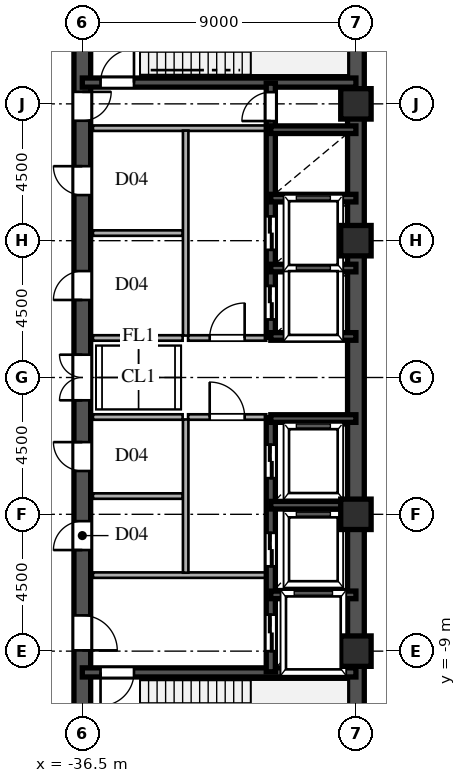
"""IFC4 building model, lengths in metres.
Left out: names, types, materials, properties, quantities, classifications, styles, units other than length and angle.
Written with IfcOpenShell. Run it as: python <this file> out.ifc"""

import sys

from ifc_helpers import new_model, si_unit, direction, frame, frame_2d, origin, origin_2d, place, context, subcontext, project, spatial, rectangle, hollow_rectangle, extrude, source, transform, mapped, element, fill, save


model = new_model("IFC4")
c1 = context("Model", 3, precision=1e-05, world=origin(), true_north=direction((0.0, 1.0)))
c2 = subcontext(c1, "Body", "Model", "MODEL_VIEW")
j1 = project(units=[si_unit("LENGTHUNIT", "METRE"), si_unit("PLANEANGLEUNIT", "RADIAN")], contexts=[c1])
p1 = place(None, origin())
s1 = spatial("IfcSite", under=j1, at=p1, CompositionType="ELEMENT")
p2 = place(p1, origin())
s2 = spatial("IfcBuilding", under=s1, at=p2, CompositionType="ELEMENT")
p3 = place(p2, frame((0.0, 0.0, 135.6)))
s3 = spatial("IfcBuildingStorey", under=s2, at=p3, CompositionType="ELEMENT", Elevation=135.6)
m1 = source(origin(), c2, "Body", "SweptSolid", [
    extrude(hollow_rectangle(XDim=1.0, YDim=1.0, WallThickness=0.042, at=origin_2d()), origin(), (0.0, 0.0, 1.0), 4.8),
])
for number, where, z_axis, x_axis in (
    (1, (-27.5, -9.0, 0.0), (0.0, 0.0, 1.0), (1.0, 0.0, 0.0)),
    (2, (-27.5, -4.5, 0.0), (0.0, 0.0, 1.0), (1.0, 0.0, 0.0)),
    (3, (-27.5, 4.5, 0.0), (0.0, 0.0, 1.0), (1.0, 0.0, 0.0)),
    (4, (-27.5, 9.0, 0.0), (0.0, 0.0, 1.0), (1.0, 0.0, 0.0)),
):
    element("IfcColumn", number, at=place(p3, frame(where, z_axis=z_axis, x_axis=x_axis)), inside=s3, PredefinedType="COLUMN", context=c2, shape_type="MappedRepresentation", body=[
        mapped(m1, transform((0.0, 0.0, 0.0), scale=1.0)),
    ])
for number, where, z_axis, x_axis in (
    (5, (-27.5, -13.5, 0.0), (0.0, 0.0, 1.0), (0.0, 1.0, 0.0)),
    (6, (-27.5, 1.3, 0.0), (0.0, 0.0, 1.0), (0.0, 1.0, 0.0)),
):
    element("IfcWall", number, at=place(p3, frame(where, z_axis=z_axis, x_axis=x_axis)), inside=s3, PredefinedType="SHEAR", context=c2, shape_type="SweptSolid", body=[
        extrude(rectangle(XDim=12.2, YDim=0.55, at=frame_2d((6.1, 0.0))), origin(), (0.0, 0.0, 1.0), 4.58),
    ])
p4 = place(p3, frame((-27.5, -1.3, 0.0), z_axis=(0.0, 0.0, 1.0), x_axis=(0.0, 1.0, 0.0)))
e7 = element("IfcWall", 7, at=p4, inside=s3, PredefinedType="SHEAR", context=c2, shape_type="SweptSolid", body=[
    extrude(rectangle(XDim=2.6, YDim=0.55, at=frame_2d((1.3, 0.0))), origin(), (0.0, 0.0, 1.0), 4.58),
])
p5 = place(p3, frame((-36.5, -13.65, 0.0), z_axis=(0.0, 0.0, 1.0), x_axis=(0.0, 1.0, 0.0)))
e8 = element("IfcWall", 8, at=p5, inside=s3, PredefinedType="SHEAR", context=c2, shape_type="SweptSolid", body=[
    extrude(rectangle(XDim=7.15, YDim=0.55, at=frame_2d((3.575, 0.0))), origin(), (0.0, 0.0, 1.0), 4.58),
])
p6 = place(p5, frame((4.675, 0.0, 0.0)))
e9 = element("IfcOpeningElement", 9, at=p6, cuts=e8, PredefinedType="OPENING", context=c2, shape_type="SweptSolid", body=[
    extrude(rectangle(XDim=1.15, YDim=2.2, at=frame_2d((0.575, 1.1))), frame((0.0, 0.285, 0.0), z_axis=(0.0, -1.0, 0.0), x_axis=(1.0, 0.0, 0.0)), (0.0, 0.0, 1.0), 0.57),
])
p7 = place(p3, frame((-36.5, -1.3, 0.0), z_axis=(0.0, 0.0, 1.0), x_axis=(0.0, 1.0, 0.0)))
e10 = element("IfcWall", 10, at=p7, inside=s3, PredefinedType="SHEAR", context=c2, shape_type="SweptSolid", body=[
    extrude(rectangle(XDim=2.6, YDim=0.55, at=frame_2d((1.3, 0.0))), origin(), (0.0, 0.0, 1.0), 4.58),
])
p8 = place(p7, frame((0.55, 0.0, 0.0)))
e11 = element("IfcOpeningElement", 11, at=p8, cuts=e10, PredefinedType="OPENING", context=c2, shape_type="SweptSolid", body=[
    extrude(rectangle(XDim=1.5, YDim=2.3, at=frame_2d((0.75, 1.15))), frame((0.0, 0.285, 0.0), z_axis=(0.0, -1.0, 0.0), x_axis=(1.0, 0.0, 0.0)), (0.0, 0.0, 1.0), 0.57),
])
p9 = place(p3, frame((-36.5, 8.2, 0.0), z_axis=(0.0, 0.0, 1.0), x_axis=(0.0, 1.0, 0.0)))
e12 = element("IfcWall", 12, at=p9, inside=s3, PredefinedType="SHEAR", context=c2, shape_type="SweptSolid", body=[
    extrude(rectangle(XDim=5.45, YDim=0.55, at=frame_2d((2.725, 0.0))), origin(), (0.0, 0.0, 1.0), 4.58),
])
p10 = place(p9, frame((0.245, 0.0, 0.0)))
e13 = element("IfcOpeningElement", 13, at=p10, cuts=e12, PredefinedType="OPENING", context=c2, shape_type="SweptSolid", body=[
    extrude(rectangle(XDim=0.95, YDim=2.15, at=frame_2d((0.475, 1.075))), frame((0.0, 0.285, 0.0), z_axis=(0.0, -1.0, 0.0), x_axis=(1.0, 0.0, 0.0)), (0.0, 0.0, 1.0), 0.57),
])
p11 = place(p3, frame((-36.5, -6.5, 0.0), z_axis=(0.0, 0.0, 1.0), x_axis=(0.0, 1.0, 0.0)))
e14 = element("IfcWall", 14, at=p11, inside=s3, PredefinedType="SHEAR", context=c2, shape_type="SweptSolid", body=[
    extrude(rectangle(XDim=2.6, YDim=0.55, at=frame_2d((1.3, 0.0))), origin(), (0.0, 0.0, 1.0), 4.58),
])
p12 = place(p11, frame((0.825, 0.0, 0.0)))
e15 = element("IfcOpeningElement", 15, at=p12, cuts=e14, PredefinedType="OPENING", context=c2, shape_type="SweptSolid", body=[
    extrude(rectangle(XDim=0.95, YDim=2.15, at=frame_2d((0.475, 1.075))), frame((0.0, 0.285, 0.0), z_axis=(0.0, -1.0, 0.0), x_axis=(1.0, 0.0, 0.0)), (0.0, 0.0, 1.0), 0.57),
])
p13 = place(p3, frame((-36.5, -3.9, 0.0), z_axis=(0.0, 0.0, 1.0), x_axis=(0.0, 1.0, 0.0)))
e16 = element("IfcWall", 16, at=p13, inside=s3, PredefinedType="SHEAR", context=c2, shape_type="SweptSolid", body=[
    extrude(rectangle(XDim=2.6, YDim=0.55, at=frame_2d((1.3, 0.0))), origin(), (0.0, 0.0, 1.0), 4.58),
])
p14 = place(p13, frame((0.825, 0.0, 0.0)))
e17 = element("IfcOpeningElement", 17, at=p14, cuts=e16, PredefinedType="OPENING", context=c2, shape_type="SweptSolid", body=[
    extrude(rectangle(XDim=0.95, YDim=2.15, at=frame_2d((0.475, 1.075))), frame((0.0, 0.285, 0.0), z_axis=(0.0, -1.0, 0.0), x_axis=(1.0, 0.0, 0.0)), (0.0, 0.0, 1.0), 0.57),
])
p15 = place(p3, frame((-36.5, 1.3, 0.0), z_axis=(0.0, 0.0, 1.0), x_axis=(0.0, 1.0, 0.0)))
e18 = element("IfcWall", 18, at=p15, inside=s3, PredefinedType="SHEAR", context=c2, shape_type="SweptSolid", body=[
    extrude(rectangle(XDim=3.45, YDim=0.55, at=frame_2d((1.725, 0.0))), origin(), (0.0, 0.0, 1.0), 4.58),
])
p16 = place(p15, frame((1.25, 0.0, 0.0)))
e19 = element("IfcOpeningElement", 19, at=p16, cuts=e18, PredefinedType="OPENING", context=c2, shape_type="SweptSolid", body=[
    extrude(rectangle(XDim=0.95, YDim=2.15, at=frame_2d((0.475, 1.075))), frame((0.0, 0.285, 0.0), z_axis=(0.0, -1.0, 0.0), x_axis=(1.0, 0.0, 0.0)), (0.0, 0.0, 1.0), 0.57),
])
p17 = place(p3, frame((-36.5, 4.75, 0.0), z_axis=(0.0, 0.0, 1.0), x_axis=(0.0, 1.0, 0.0)))
e20 = element("IfcWall", 20, at=p17, inside=s3, PredefinedType="SHEAR", context=c2, shape_type="SweptSolid", body=[
    extrude(rectangle(XDim=3.45, YDim=0.55, at=frame_2d((1.725, 0.0))), origin(), (0.0, 0.0, 1.0), 4.58),
])
p18 = place(p17, frame((1.25, 0.0, 0.0)))
e21 = element("IfcOpeningElement", 21, at=p18, cuts=e20, PredefinedType="OPENING", context=c2, shape_type="SweptSolid", body=[
    extrude(rectangle(XDim=0.95, YDim=2.15, at=frame_2d((0.475, 1.075))), frame((0.0, 0.285, 0.0), z_axis=(0.0, -1.0, 0.0), x_axis=(1.0, 0.0, 0.0)), (0.0, 0.0, 1.0), 0.57),
])
p19 = place(p3, frame((-36.5, -9.7, 0.0), z_axis=(0.0, 0.0, 1.0), x_axis=(1.0, 0.0, 0.0)))
e22 = element("IfcWall", 22, at=p19, inside=s3, PredefinedType="SHEAR", context=c2, shape_type="SweptSolid", body=[
    extrude(rectangle(XDim=9.0, YDim=0.3, at=frame_2d((4.5, 0.0))), origin(), (0.0, 0.0, 1.0), 4.58),
])
p20 = place(p19, frame((0.6, 0.0, 0.0)))
e23 = element("IfcOpeningElement", 23, at=p20, cuts=e22, PredefinedType="OPENING", context=c2, shape_type="SweptSolid", body=[
    extrude(rectangle(XDim=1.1, YDim=2.2, at=frame_2d((0.55, 1.1))), frame((0.0, 0.16, 0.0), z_axis=(0.0, -1.0, 0.0), x_axis=(1.0, 0.0, 0.0)), (0.0, 0.0, 1.0), 0.32),
])
p21 = place(p3, frame((-36.5, 9.7, 0.0), z_axis=(0.0, 0.0, 1.0), x_axis=(1.0, 0.0, 0.0)))
e24 = element("IfcWall", 24, at=p21, inside=s3, PredefinedType="SHEAR", context=c2, shape_type="SweptSolid", body=[
    extrude(rectangle(XDim=9.0, YDim=0.3, at=frame_2d((4.5, 0.0))), origin(), (0.0, 0.0, 1.0), 4.58),
])
p22 = place(p21, frame((0.6, 0.0, 0.0)))
e25 = element("IfcOpeningElement", 25, at=p22, cuts=e24, PredefinedType="OPENING", context=c2, shape_type="SweptSolid", body=[
    extrude(rectangle(XDim=1.1, YDim=2.2, at=frame_2d((0.55, 1.1))), frame((0.0, 0.16, 0.0), z_axis=(0.0, -1.0, 0.0), x_axis=(1.0, 0.0, 0.0)), (0.0, 0.0, 1.0), 0.32),
])
for number, where, z_axis, x_axis in (
    (26, (-30.3, -7.15, 0.0), (0.0, 0.0, 1.0), (1.0, 0.0, 0.0)),
    (27, (-30.3, -4.2, 0.0), (0.0, 0.0, 1.0), (1.0, 0.0, 0.0)),
    (28, (-30.3, -1.35, 0.0), (0.0, 0.0, 1.0), (1.0, 0.0, 0.0)),
    (29, (-30.3, 1.35, 0.0), (0.0, 0.0, 1.0), (1.0, 0.0, 0.0)),
    (30, (-30.3, 3.6, 0.0), (0.0, 0.0, 1.0), (1.0, 0.0, 0.0)),
    (31, (-30.3, 5.9, 0.0), (0.0, 0.0, 1.0), (1.0, 0.0, 0.0)),
    (32, (-30.3, 8.15, 0.0), (0.0, 0.0, 1.0), (1.0, 0.0, 0.0)),
):
    element("IfcWall", number, at=place(p3, frame(where, z_axis=z_axis, x_axis=x_axis)), inside=s3, PredefinedType="SHEAR", context=c2, shape_type="SweptSolid", body=[
        extrude(rectangle(XDim=2.8, YDim=0.25, at=frame_2d((1.4, 0.0))), origin(), (0.0, 0.0, 1.0), 4.58),
    ])
p23 = place(p3, frame((-30.3, -9.68, 0.0), z_axis=(0.0, 0.0, 1.0), x_axis=(0.0, 1.0, 0.0)))
e33 = element("IfcWall", 33, at=p23, inside=s3, PredefinedType="SHEAR", context=c2, shape_type="SweptSolid", body=[
    extrude(rectangle(XDim=2.56, YDim=0.3, at=frame_2d((1.28, 0.0))), origin(), (0.0, 0.0, 1.0), 4.58),
])
p24 = place(p23, frame((0.68, 0.0, 0.0)))
e34 = element("IfcOpeningElement", 34, at=p24, cuts=e33, PredefinedType="OPENING", context=c2, shape_type="SweptSolid", body=[
    extrude(rectangle(XDim=1.2, YDim=2.25, at=frame_2d((0.6, 1.125))), frame((0.0, 0.16, 0.0), z_axis=(0.0, -1.0, 0.0), x_axis=(1.0, 0.0, 0.0)), (0.0, 0.0, 1.0), 0.32),
])
p25 = place(p3, frame((-30.3, -7.12, 0.0), z_axis=(0.0, 0.0, 1.0), x_axis=(0.0, 1.0, 0.0)))
e35 = element("IfcWall", 35, at=p25, inside=s3, PredefinedType="SHEAR", context=c2, shape_type="SweptSolid", body=[
    extrude(rectangle(XDim=2.92, YDim=0.3, at=frame_2d((1.46, 0.0))), origin(), (0.0, 0.0, 1.0), 4.58),
])
p26 = place(p25, frame((0.91, 0.0, 0.0)))
e36 = element("IfcOpeningElement", 36, at=p26, cuts=e35, PredefinedType="OPENING", context=c2, shape_type="SweptSolid", body=[
    extrude(rectangle(XDim=1.1, YDim=2.2, at=frame_2d((0.55, 1.1))), frame((0.0, 0.16, 0.0), z_axis=(0.0, -1.0, 0.0), x_axis=(1.0, 0.0, 0.0)), (0.0, 0.0, 1.0), 0.32),
])
p27 = place(p3, frame((-30.3, -4.2, 0.0), z_axis=(0.0, 0.0, 1.0), x_axis=(0.0, 1.0, 0.0)))
e37 = element("IfcWall", 37, at=p27, inside=s3, PredefinedType="SHEAR", context=c2, shape_type="SweptSolid", body=[
    extrude(rectangle(XDim=2.88, YDim=0.3, at=frame_2d((1.44, 0.0))), origin(), (0.0, 0.0, 1.0), 4.58),
])
p28 = place(p27, frame((0.89, 0.0, 0.0)))
e38 = element("IfcOpeningElement", 38, at=p28, cuts=e37, PredefinedType="OPENING", context=c2, shape_type="SweptSolid", body=[
    extrude(rectangle(XDim=1.1, YDim=2.2, at=frame_2d((0.55, 1.1))), frame((0.0, 0.16, 0.0), z_axis=(0.0, -1.0, 0.0), x_axis=(1.0, 0.0, 0.0)), (0.0, 0.0, 1.0), 0.32),
])
p29 = place(p3, frame((-30.3, 1.32, 0.0), z_axis=(0.0, 0.0, 1.0), x_axis=(0.0, 1.0, 0.0)))
e39 = element("IfcWall", 39, at=p29, inside=s3, PredefinedType="SHEAR", context=c2, shape_type="SweptSolid", body=[
    extrude(rectangle(XDim=2.28, YDim=0.3, at=frame_2d((1.14, 0.0))), origin(), (0.0, 0.0, 1.0), 4.58),
])
p30 = place(p29, frame((0.59, 0.0, 0.0)))
e40 = element("IfcOpeningElement", 40, at=p30, cuts=e39, PredefinedType="OPENING", context=c2, shape_type="SweptSolid", body=[
    extrude(rectangle(XDim=1.1, YDim=2.2, at=frame_2d((0.55, 1.1))), frame((0.0, 0.16, 0.0), z_axis=(0.0, -1.0, 0.0), x_axis=(1.0, 0.0, 0.0)), (0.0, 0.0, 1.0), 0.32),
])
p31 = place(p3, frame((-30.3, 3.6, 0.0), z_axis=(0.0, 0.0, 1.0), x_axis=(0.0, 1.0, 0.0)))
e41 = element("IfcWall", 41, at=p31, inside=s3, PredefinedType="SHEAR", context=c2, shape_type="SweptSolid", body=[
    extrude(rectangle(XDim=2.3, YDim=0.3, at=frame_2d((1.15, 0.0))), origin(), (0.0, 0.0, 1.0), 4.58),
])
p32 = place(p31, frame((0.6, 0.0, 0.0)))
e42 = element("IfcOpeningElement", 42, at=p32, cuts=e41, PredefinedType="OPENING", context=c2, shape_type="SweptSolid", body=[
    extrude(rectangle(XDim=1.1, YDim=2.2, at=frame_2d((0.55, 1.1))), frame((0.0, 0.16, 0.0), z_axis=(0.0, -1.0, 0.0), x_axis=(1.0, 0.0, 0.0)), (0.0, 0.0, 1.0), 0.32),
])
p33 = place(p3, frame((-30.3, 5.9, 0.0), z_axis=(0.0, 0.0, 1.0), x_axis=(0.0, 1.0, 0.0)))
e43 = element("IfcWall", 43, at=p33, inside=s3, PredefinedType="SHEAR", context=c2, shape_type="SweptSolid", body=[
    extrude(rectangle(XDim=2.25, YDim=0.3, at=frame_2d((1.125, 0.0))), origin(), (0.0, 0.0, 1.0), 4.58),
])
p34 = place(p3, frame((-30.3, 8.15, 0.0), z_axis=(0.0, 0.0, 1.0), x_axis=(0.0, 1.0, 0.0)))
e44 = element("IfcWall", 44, at=p34, inside=s3, PredefinedType="SHEAR", context=c2, shape_type="SweptSolid", body=[
    extrude(rectangle(XDim=1.53, YDim=0.3, at=frame_2d((0.765, 0.0))), origin(), (0.0, 0.0, 1.0), 4.58),
])
p35 = place(p34, frame((0.285, 0.0, 0.0)))
e45 = element("IfcOpeningElement", 45, at=p35, cuts=e44, PredefinedType="OPENING", context=c2, shape_type="SweptSolid", body=[
    extrude(rectangle(XDim=0.95, YDim=2.15, at=frame_2d((0.475, 1.075))), frame((0.0, 0.16, 0.0), z_axis=(0.0, -1.0, 0.0), x_axis=(1.0, 0.0, 0.0)), (0.0, 0.0, 1.0), 0.32),
])
for number, where, z_axis, x_axis in (
    (46, (-36.15, -6.5, 0.0), (0.0, 0.0, 1.0), (1.0, 0.0, 0.0)),
    (47, (-36.15, 8.2, 0.0), (0.0, 0.0, 1.0), (1.0, 0.0, 0.0)),
):
    element("IfcWall", number, at=place(p3, frame(where, z_axis=z_axis, x_axis=x_axis)), inside=s3, PredefinedType="PARTITIONING", context=c2, shape_type="SweptSolid", body=[
        extrude(rectangle(XDim=5.7, YDim=0.18, at=frame_2d((2.85, 0.0))), origin(), (0.0, 0.0, 1.0), 4.58),
    ])
p36 = place(p3, frame((-33.1, -6.42, 0.0), z_axis=(0.0, 0.0, 1.0), x_axis=(0.0, 1.0, 0.0)))
e48 = element("IfcWall", 48, at=p36, inside=s3, PredefinedType="PARTITIONING", context=c2, shape_type="SweptSolid", body=[
    extrude(rectangle(XDim=5.04, YDim=0.18, at=frame_2d((2.52, 0.0))), origin(), (0.0, 0.0, 1.0), 4.58),
])
p37 = place(p3, frame((-33.1, 1.38, 0.0), z_axis=(0.0, 0.0, 1.0), x_axis=(0.0, 1.0, 0.0)))
e49 = element("IfcWall", 49, at=p37, inside=s3, PredefinedType="PARTITIONING", context=c2, shape_type="SweptSolid", body=[
    extrude(rectangle(XDim=6.74, YDim=0.18, at=frame_2d((3.37, 0.0))), origin(), (0.0, 0.0, 1.0), 4.58),
])
p38 = place(p3, frame((-33.02, -1.3, 0.0), z_axis=(0.0, 0.0, 1.0), x_axis=(1.0, 0.0, 0.0)))
e50 = element("IfcWall", 50, at=p38, inside=s3, PredefinedType="PARTITIONING", context=c2, shape_type="SweptSolid", body=[
    extrude(rectangle(XDim=2.57, YDim=0.18, at=frame_2d((1.285, 0.0))), origin(), (0.0, 0.0, 1.0), 4.58),
])
p39 = place(p38, frame((0.71, 0.0, 0.0)))
e51 = element("IfcOpeningElement", 51, at=p39, cuts=e50, PredefinedType="OPENING", context=c2, shape_type="SweptSolid", body=[
    extrude(rectangle(XDim=1.15, YDim=2.2, at=frame_2d((0.575, 1.1))), frame((0.0, 0.1, 0.0), z_axis=(0.0, -1.0, 0.0), x_axis=(1.0, 0.0, 0.0)), (0.0, 0.0, 1.0), 0.2),
])
p40 = place(p3, frame((-33.02, 1.3, 0.0), z_axis=(0.0, 0.0, 1.0), x_axis=(1.0, 0.0, 0.0)))
e52 = element("IfcWall", 52, at=p40, inside=s3, PredefinedType="PARTITIONING", context=c2, shape_type="SweptSolid", body=[
    extrude(rectangle(XDim=2.57, YDim=0.18, at=frame_2d((1.285, 0.0))), origin(), (0.0, 0.0, 1.0), 4.58),
])
p41 = place(p40, frame((0.71, 0.0, 0.0)))
e53 = element("IfcOpeningElement", 53, at=p41, cuts=e52, PredefinedType="OPENING", context=c2, shape_type="SweptSolid", body=[
    extrude(rectangle(XDim=1.15, YDim=2.2, at=frame_2d((0.575, 1.1))), frame((0.0, 0.1, 0.0), z_axis=(0.0, -1.0, 0.0), x_axis=(1.0, 0.0, 0.0)), (0.0, 0.0, 1.0), 0.2),
])
for number, where, z_axis, x_axis in (
    (54, (-36.15, -1.3, 0.0), (0.0, 0.0, 1.0), (1.0, 0.0, 0.0)),
    (55, (-36.15, 1.3, 0.0), (0.0, 0.0, 1.0), (1.0, 0.0, 0.0)),
    (56, (-36.15, -3.9, 0.0), (0.0, 0.0, 1.0), (1.0, 0.0, 0.0)),
    (57, (-36.15, 4.75, 0.0), (0.0, 0.0, 1.0), (1.0, 0.0, 0.0)),
):
    element("IfcWall", number, at=place(p3, frame(where, z_axis=z_axis, x_axis=x_axis)), inside=s3, PredefinedType="PARTITIONING", context=c2, shape_type="SweptSolid", body=[
        extrude(rectangle(XDim=2.95, YDim=0.18, at=frame_2d((1.475, 0.0))), origin(), (0.0, 0.0, 1.0), 4.58),
    ])
m2 = source(origin(), c2, "Body", "SweptSolid", [
    extrude(rectangle(XDim=1.15, YDim=2.2, at=frame_2d((0.575, 1.1))), frame((0.0, 0.025, 0.0), z_axis=(0.0, -1.0, 0.0), x_axis=(1.0, 0.0, 0.0)), (0.0, 0.0, 1.0), 0.05),
])
p42 = place(p6, frame((1.15, 0.0, 0.0), z_axis=(0.0, 0.0, 1.0), x_axis=(-1.0, 0.0, 0.0)))
e58 = element("IfcDoor", 58, at=p42, inside=s3, OperationType="SINGLE_SWING_LEFT", PredefinedType="DOOR", context=c2, shape_type="MappedRepresentation", body=[
    mapped(m2, transform((0.0, 0.0, 0.0), scale=1.0)),
])
fill(e9, e58)
m3 = source(origin(), c2, "Body", "SweptSolid", [
    extrude(rectangle(XDim=1.5, YDim=2.3, at=frame_2d((0.75, 1.15))), frame((0.0, 0.025, 0.0), z_axis=(0.0, -1.0, 0.0), x_axis=(1.0, 0.0, 0.0)), (0.0, 0.0, 1.0), 0.05),
])
p43 = place(p8, origin())
e59 = element("IfcDoor", 59, at=p43, inside=s3, OperationType="DOUBLE_SWING_LEFT", PredefinedType="DOOR", context=c2, shape_type="MappedRepresentation", body=[
    mapped(m3, transform((0.0, 0.0, 0.0), scale=1.0)),
])
fill(e11, e59)
m4 = source(origin(), c2, "Body", "SweptSolid", [
    extrude(rectangle(XDim=0.95, YDim=2.15, at=frame_2d((0.475, 1.075))), frame((0.0, 0.025, 0.0), z_axis=(0.0, -1.0, 0.0), x_axis=(1.0, 0.0, 0.0)), (0.0, 0.0, 1.0), 0.05),
])
p44 = place(p10, frame((0.95, 0.0, 0.0), z_axis=(0.0, 0.0, 1.0), x_axis=(-1.0, 0.0, 0.0)))
e60 = element("IfcDoor", 60, at=p44, inside=s3, OperationType="SINGLE_SWING_RIGHT", PredefinedType="DOOR", context=c2, shape_type="MappedRepresentation", body=[
    mapped(m4, transform((0.0, 0.0, 0.0), scale=1.0)),
])
fill(e13, e60)
p45 = place(p12, origin())
e61 = element("IfcDoor", 61, at=p45, inside=s3, OperationType="SINGLE_SWING_LEFT", PredefinedType="DOOR", context=c2, shape_type="MappedRepresentation", body=[
    mapped(m4, transform((0.0, 0.0, 0.0), scale=1.0)),
])
fill(e15, e61)
p46 = place(p14, origin())
e62 = element("IfcDoor", 62, at=p46, inside=s3, OperationType="SINGLE_SWING_RIGHT", PredefinedType="DOOR", context=c2, shape_type="MappedRepresentation", body=[
    mapped(m4, transform((0.0, 0.0, 0.0), scale=1.0)),
])
fill(e17, e62)
p47 = place(p16, origin())
e63 = element("IfcDoor", 63, at=p47, inside=s3, OperationType="SINGLE_SWING_LEFT", PredefinedType="DOOR", context=c2, shape_type="MappedRepresentation", body=[
    mapped(m4, transform((0.0, 0.0, 0.0), scale=1.0)),
])
fill(e19, e63)
p48 = place(p18, origin())
e64 = element("IfcDoor", 64, at=p48, inside=s3, OperationType="SINGLE_SWING_RIGHT", PredefinedType="DOOR", context=c2, shape_type="MappedRepresentation", body=[
    mapped(m4, transform((0.0, 0.0, 0.0), scale=1.0)),
])
fill(e21, e64)
m5 = source(origin(), c2, "Body", "SweptSolid", [
    extrude(rectangle(XDim=1.1, YDim=2.2, at=frame_2d((0.55, 1.1))), frame((0.0, 0.025, 0.0), z_axis=(0.0, -1.0, 0.0), x_axis=(1.0, 0.0, 0.0)), (0.0, 0.0, 1.0), 0.05),
])
p49 = place(p20, frame((1.1, 0.0, 0.0), z_axis=(0.0, 0.0, 1.0), x_axis=(-1.0, 0.0, 0.0)))
e65 = element("IfcDoor", 65, at=p49, inside=s3, OperationType="SINGLE_SWING_LEFT", PredefinedType="DOOR", context=c2, shape_type="MappedRepresentation", body=[
    mapped(m5, transform((0.0, 0.0, 0.0), scale=1.0)),
])
fill(e23, e65)
p50 = place(p22, origin())
e66 = element("IfcDoor", 66, at=p50, inside=s3, OperationType="SINGLE_SWING_RIGHT", PredefinedType="DOOR", context=c2, shape_type="MappedRepresentation", body=[
    mapped(m5, transform((0.0, 0.0, 0.0), scale=1.0)),
])
fill(e25, e66)
m6 = source(origin(), c2, "Body", "SweptSolid", [
    extrude(rectangle(XDim=1.2, YDim=2.25, at=frame_2d((0.6, 1.125))), frame((0.0, 0.025, 0.0), z_axis=(0.0, -1.0, 0.0), x_axis=(1.0, 0.0, 0.0)), (0.0, 0.0, 1.0), 0.05),
])
p51 = place(p24, origin())
e67 = element("IfcDoor", 67, at=p51, inside=s3, OperationType="DOUBLE_DOOR_SLIDING", PredefinedType="DOOR", context=c2, shape_type="MappedRepresentation", body=[
    mapped(m6, transform((0.0, 0.0, 0.0), scale=1.0)),
])
fill(e34, e67)
m7 = source(origin(), c2, "Body", "SweptSolid", [
    extrude(rectangle(XDim=1.1, YDim=2.2, at=frame_2d((0.55, 1.1))), frame((0.0, 0.025, 0.0), z_axis=(0.0, -1.0, 0.0), x_axis=(1.0, 0.0, 0.0)), (0.0, 0.0, 1.0), 0.05),
])
p52 = place(p26, origin())
e68 = element("IfcDoor", 68, at=p52, inside=s3, OperationType="DOUBLE_DOOR_SLIDING", PredefinedType="DOOR", context=c2, shape_type="MappedRepresentation", body=[
    mapped(m7, transform((0.0, 0.0, 0.0), scale=1.0)),
])
fill(e36, e68)
p53 = place(p28, origin())
e69 = element("IfcDoor", 69, at=p53, inside=s3, OperationType="DOUBLE_DOOR_SLIDING", PredefinedType="DOOR", context=c2, shape_type="MappedRepresentation", body=[
    mapped(m7, transform((0.0, 0.0, 0.0), scale=1.0)),
])
fill(e38, e69)
p54 = place(p30, origin())
e70 = element("IfcDoor", 70, at=p54, inside=s3, OperationType="DOUBLE_DOOR_SLIDING", PredefinedType="DOOR", context=c2, shape_type="MappedRepresentation", body=[
    mapped(m7, transform((0.0, 0.0, 0.0), scale=1.0)),
])
fill(e40, e70)
p55 = place(p32, origin())
e71 = element("IfcDoor", 71, at=p55, inside=s3, OperationType="DOUBLE_DOOR_SLIDING", PredefinedType="DOOR", context=c2, shape_type="MappedRepresentation", body=[
    mapped(m7, transform((0.0, 0.0, 0.0), scale=1.0)),
])
fill(e42, e71)
p56 = place(p35, origin())
e72 = element("IfcDoor", 72, at=p56, inside=s3, OperationType="SINGLE_SWING_LEFT", PredefinedType="DOOR", context=c2, shape_type="MappedRepresentation", body=[
    mapped(m4, transform((0.0, 0.0, 0.0), scale=1.0)),
])
fill(e45, e72)
p57 = place(p39, origin())
e73 = element("IfcDoor", 73, at=p57, inside=s3, OperationType="SINGLE_SWING_LEFT", PredefinedType="DOOR", context=c2, shape_type="MappedRepresentation", body=[
    mapped(m2, transform((0.0, 0.0, 0.0), scale=1.0)),
])
fill(e51, e73)
p58 = place(p41, origin())
e74 = element("IfcDoor", 74, at=p58, inside=s3, OperationType="SINGLE_SWING_RIGHT", PredefinedType="DOOR", context=c2, shape_type="MappedRepresentation", body=[
    mapped(m2, transform((0.0, 0.0, 0.0), scale=1.0)),
])
fill(e53, e74)
save(model, sys.argv[1])
